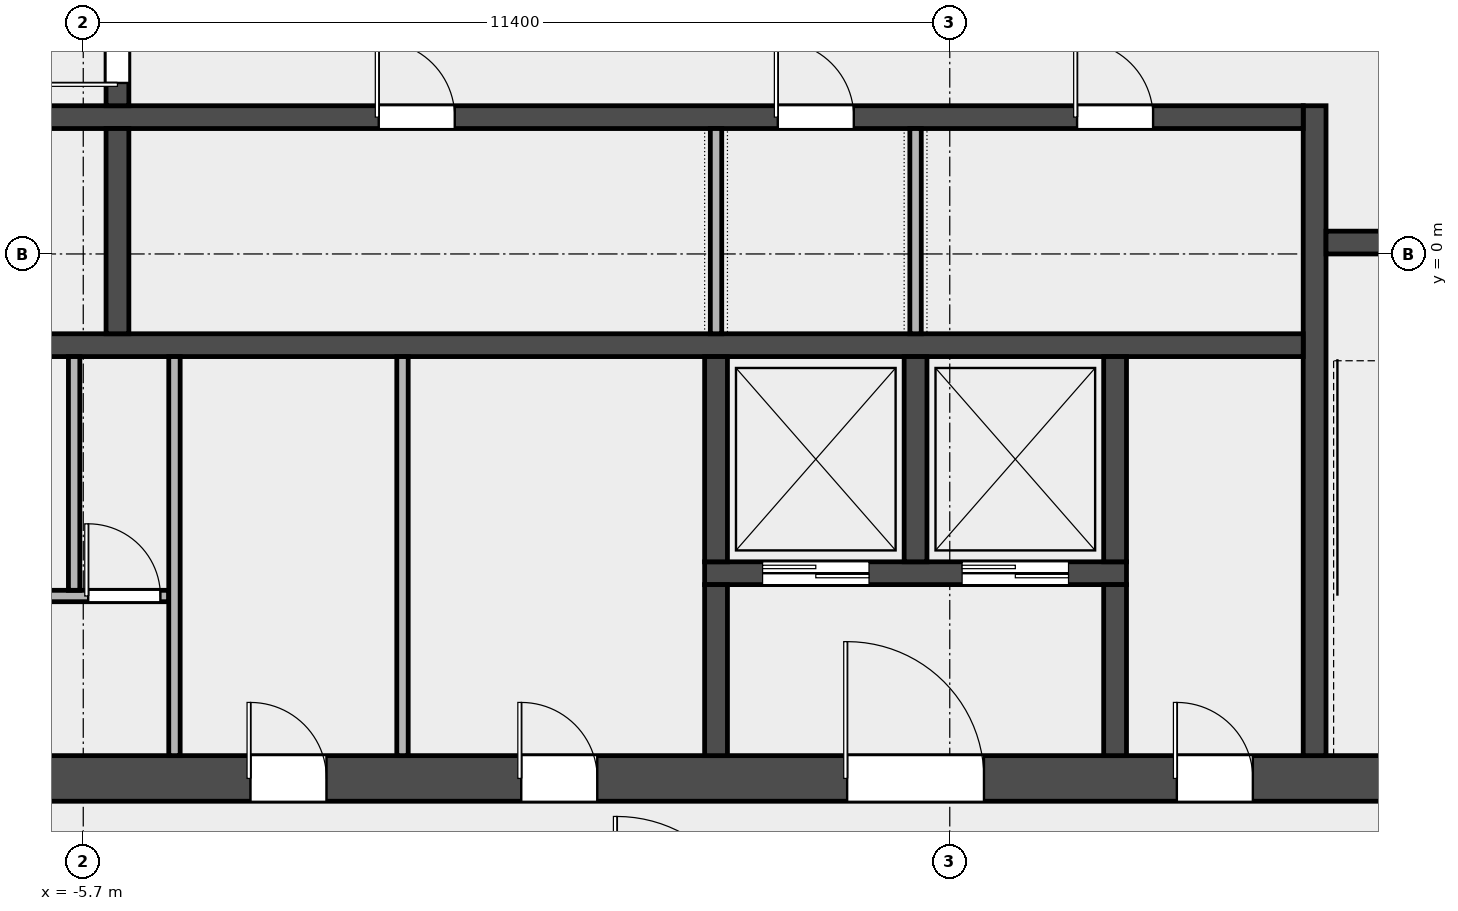
"""IFC4 building model, lengths in metres.
Left out: names, types, materials, properties, quantities, classifications, styles, units other than length and angle.
Written with IfcOpenShell. Run it as: python <this file> out.ifc"""

import sys

from ifc_helpers import new_model, si_unit, direction, frame, frame_2d, origin, place, context, subcontext, project, spatial, rectangle, extrude, element, fill, save


model = new_model("IFC4")
c1 = context("Model", 3, precision=1e-05, world=origin(), true_north=direction((0.0, 1.0)))
c2 = subcontext(c1, "Body", "Model", "MODEL_VIEW")
j1 = project(units=[si_unit("LENGTHUNIT", "METRE"), si_unit("PLANEANGLEUNIT", "RADIAN")], contexts=[c1])
p1 = place(None, origin())
s1 = spatial("IfcSite", under=j1, at=p1, CompositionType="ELEMENT")
p2 = place(p1, origin())
s2 = spatial("IfcBuilding", under=s1, at=p2, CompositionType="ELEMENT")
p3 = place(p2, frame((0.0, 0.0, 247.0)))
s3 = spatial("IfcBuildingStorey", under=s2, at=p3, CompositionType="ELEMENT", Elevation=247.0)
p4 = place(p3, frame((-14.4, -6.9, 0.0), z_axis=(0.0, 0.0, 1.0), x_axis=(1.0, 0.0, 0.0)))
e1 = element("IfcWall", 1, at=p4, inside=s3, PredefinedType="SHEAR", context=c2, shape_type="SweptSolid", body=[
    extrude(rectangle(XDim=28.8, YDim=0.6, at=frame_2d((14.4, 0.0))), origin(), (0.0, 0.0, 1.0), 3.7),
])
p5 = place(p4, frame((6.3, 0.0, 0.0)))
e2 = element("IfcOpeningElement", 2, at=p5, cuts=e1, PredefinedType="OPENING", context=c2, shape_type="SweptSolid", body=[
    extrude(rectangle(XDim=1.2, YDim=2.1, at=frame_2d((0.6, 1.05))), frame((0.0, 0.312, 0.0), z_axis=(0.0, -1.0, 0.0), x_axis=(1.0, 0.0, 0.0)), (0.0, 0.0, 1.0), 0.624),
])
p6 = place(p4, frame((10.9, 0.0, 0.0)))
e3 = element("IfcOpeningElement", 3, at=p6, cuts=e1, PredefinedType="OPENING", context=c2, shape_type="SweptSolid", body=[
    extrude(rectangle(XDim=1.0, YDim=2.1, at=frame_2d((0.5, 1.05))), frame((0.0, 0.312, 0.0), z_axis=(0.0, -1.0, 0.0), x_axis=(1.0, 0.0, 0.0)), (0.0, 0.0, 1.0), 0.624),
])
p7 = place(p4, frame((14.462, 0.0, 0.0)))
e4 = element("IfcOpeningElement", 4, at=p7, cuts=e1, PredefinedType="OPENING", context=c2, shape_type="SweptSolid", body=[
    extrude(rectangle(XDim=1.0, YDim=2.1, at=frame_2d((0.5, 1.05))), frame((0.0, 0.312, 0.0), z_axis=(0.0, -1.0, 0.0), x_axis=(1.0, 0.0, 0.0)), (0.0, 0.0, 1.0), 0.624),
])
p8 = place(p4, frame((18.75, 0.0, 0.0)))
e5 = element("IfcOpeningElement", 5, at=p8, cuts=e1, PredefinedType="OPENING", context=c2, shape_type="SweptSolid", body=[
    extrude(rectangle(XDim=1.8, YDim=2.1, at=frame_2d((0.9, 1.05))), frame((0.0, 0.312, 0.0), z_axis=(0.0, -1.0, 0.0), x_axis=(1.0, 0.0, 0.0)), (0.0, 0.0, 1.0), 0.624),
])
p9 = place(p4, frame((23.087, 0.0, 0.0)))
e6 = element("IfcOpeningElement", 6, at=p9, cuts=e1, PredefinedType="OPENING", context=c2, shape_type="SweptSolid", body=[
    extrude(rectangle(XDim=1.0, YDim=2.1, at=frame_2d((0.5, 1.05))), frame((0.0, 0.312, 0.0), z_axis=(0.0, -1.0, 0.0), x_axis=(1.0, 0.0, 0.0)), (0.0, 0.0, 1.0), 0.624),
])
p10 = place(p3, frame((10.5, -6.6, 0.0), z_axis=(0.0, 0.0, 1.0), x_axis=(0.0, 1.0, 0.0)))
e7 = element("IfcWall", 7, at=p10, inside=s3, PredefinedType="SHEAR", context=c2, shape_type="SweptSolid", body=[
    extrude(rectangle(XDim=8.55, YDim=0.3, at=frame_2d((4.275, 0.0))), origin(), (0.0, 0.0, 1.0), 3.7),
])
p11 = place(p3, frame((10.65, 0.15, 0.0), z_axis=(0.0, 0.0, 1.0), x_axis=(1.0, 0.0, 0.0)))
e8 = element("IfcWall", 8, at=p11, inside=s3, PredefinedType="SOLIDWALL", context=c2, shape_type="SweptSolid", body=[
    extrude(rectangle(XDim=3.15, YDim=0.3, at=frame_2d((1.575, 0.0))), origin(), (0.0, 0.0, 1.0), 3.7),
])
p12 = place(p11, frame((1.025, 0.0, 0.0)))
e9 = element("IfcOpeningElement", 9, at=p12, cuts=e8, PredefinedType="OPENING", context=c2, shape_type="SweptSolid", body=[
    extrude(rectangle(XDim=1.1, YDim=2.1, at=frame_2d((0.55, 1.05))), frame((0.0, 0.162, 0.0), z_axis=(0.0, -1.0, 0.0), x_axis=(1.0, 0.0, 0.0)), (0.0, 0.0, 1.0), 0.324),
])
p13 = place(p3, frame((-10.35, -1.2, 0.0), z_axis=(0.0, 0.0, 1.0), x_axis=(1.0, 0.0, 0.0)))
e10 = element("IfcWall", 10, at=p13, inside=s3, PredefinedType="SOLIDWALL", context=c2, shape_type="SweptSolid", body=[
    extrude(rectangle(XDim=20.7, YDim=0.3, at=frame_2d((10.35, 0.0))), origin(), (0.0, 0.0, 1.0), 3.7),
])
p14 = place(p3, frame((-10.35, 1.8, 0.0), z_axis=(0.0, 0.0, 1.0), x_axis=(1.0, 0.0, 0.0)))
e11 = element("IfcWall", 11, at=p14, inside=s3, PredefinedType="SOLIDWALL", context=c2, shape_type="SweptSolid", body=[
    extrude(rectangle(XDim=20.7, YDim=0.3, at=frame_2d((10.35, 0.0))), origin(), (0.0, 0.0, 1.0), 3.7),
])
p15 = place(p14, frame((0.512, 0.0, 0.0)))
e12 = element("IfcOpeningElement", 12, at=p15, cuts=e11, PredefinedType="OPENING", context=c2, shape_type="SweptSolid", body=[
    extrude(rectangle(XDim=1.3, YDim=2.1, at=frame_2d((0.65, 1.05))), frame((0.0, 0.162, 0.0), z_axis=(0.0, -1.0, 0.0), x_axis=(1.0, 0.0, 0.0)), (0.0, 0.0, 1.0), 0.324),
])
p16 = place(p14, frame((8.538, 0.0, 0.0)))
e13 = element("IfcOpeningElement", 13, at=p16, cuts=e11, PredefinedType="OPENING", context=c2, shape_type="SweptSolid", body=[
    extrude(rectangle(XDim=1.0, YDim=2.1, at=frame_2d((0.5, 1.05))), frame((0.0, 0.162, 0.0), z_axis=(0.0, -1.0, 0.0), x_axis=(1.0, 0.0, 0.0)), (0.0, 0.0, 1.0), 0.324),
])
p17 = place(p14, frame((13.788, 0.0, 0.0)))
e14 = element("IfcOpeningElement", 14, at=p17, cuts=e11, PredefinedType="OPENING", context=c2, shape_type="SweptSolid", body=[
    extrude(rectangle(XDim=1.0, YDim=2.1, at=frame_2d((0.5, 1.05))), frame((0.0, 0.162, 0.0), z_axis=(0.0, -1.0, 0.0), x_axis=(1.0, 0.0, 0.0)), (0.0, 0.0, 1.0), 0.324),
])
p18 = place(p14, frame((17.725, 0.0, 0.0)))
e15 = element("IfcOpeningElement", 15, at=p18, cuts=e11, PredefinedType="OPENING", context=c2, shape_type="SweptSolid", body=[
    extrude(rectangle(XDim=1.0, YDim=2.1, at=frame_2d((0.5, 1.05))), frame((0.0, 0.162, 0.0), z_axis=(0.0, -1.0, 0.0), x_axis=(1.0, 0.0, 0.0)), (0.0, 0.0, 1.0), 0.324),
])
p19 = place(p3, frame((-5.25, -1.05, 0.0), z_axis=(0.0, 0.0, 1.0), x_axis=(0.0, 1.0, 0.0)))
e16 = element("IfcWall", 16, at=p19, inside=s3, PredefinedType="SOLIDWALL", context=c2, shape_type="SweptSolid", body=[
    extrude(rectangle(XDim=2.7, YDim=0.3, at=frame_2d((1.35, 0.0))), origin(), (0.0, 0.0, 1.0), 3.7),
])
p20 = place(p3, frame((-5.25, 1.95, 0.0), z_axis=(0.0, 0.0, 1.0), x_axis=(0.0, 1.0, 0.0)))
e17 = element("IfcWall", 17, at=p20, inside=s3, PredefinedType="SOLIDWALL", context=c2, shape_type="SweptSolid", body=[
    extrude(rectangle(XDim=3.3, YDim=0.3, at=frame_2d((1.65, 0.0))), origin(), (0.0, 0.0, 1.0), 3.7),
])
p21 = place(p20, frame((0.3, 0.0, 0.0)))
e18 = element("IfcOpeningElement", 18, at=p21, cuts=e17, PredefinedType="OPENING", context=c2, shape_type="SweptSolid", body=[
    extrude(rectangle(XDim=1.2, YDim=2.1, at=frame_2d((0.6, 1.05))), frame((0.0, 0.162, 0.0), z_axis=(0.0, -1.0, 0.0), x_axis=(1.0, 0.0, 0.0)), (0.0, 0.0, 1.0), 0.324),
])
p22 = place(p20, frame((1.8, 0.0, 0.0)))
e19 = element("IfcOpeningElement", 19, at=p22, cuts=e17, PredefinedType="OPENING", context=c2, shape_type="SweptSolid", body=[
    extrude(rectangle(XDim=1.2, YDim=2.1, at=frame_2d((0.6, 1.05))), frame((0.0, 0.162, 0.0), z_axis=(0.0, -1.0, 0.0), x_axis=(1.0, 0.0, 0.0)), (0.0, 0.0, 1.0), 0.324),
])
p23 = place(p3, frame((2.475, -4.2, 0.0), z_axis=(0.0, 0.0, 1.0), x_axis=(1.0, 0.0, 0.0)))
e20 = element("IfcWall", 20, at=p23, inside=s3, PredefinedType="SOLIDWALL", context=c2, shape_type="SweptSolid", body=[
    extrude(rectangle(XDim=5.55, YDim=0.3, at=frame_2d((2.775, 0.0))), origin(), (0.0, 0.0, 1.0), 3.7),
])
p24 = place(p23, frame((0.762, 0.0, 0.0)))
e21 = element("IfcOpeningElement", 21, at=p24, cuts=e20, PredefinedType="OPENING", context=c2, shape_type="SweptSolid", body=[
    extrude(rectangle(XDim=1.4, YDim=2.1, at=frame_2d((0.7, 1.05))), frame((0.0, 0.162, 0.0), z_axis=(0.0, -1.0, 0.0), x_axis=(1.0, 0.0, 0.0)), (0.0, 0.0, 1.0), 0.324),
])
p25 = place(p23, frame((3.387, 0.0, 0.0)))
e22 = element("IfcOpeningElement", 22, at=p25, cuts=e20, PredefinedType="OPENING", context=c2, shape_type="SweptSolid", body=[
    extrude(rectangle(XDim=1.4, YDim=2.1, at=frame_2d((0.7, 1.05))), frame((0.0, 0.162, 0.0), z_axis=(0.0, -1.0, 0.0), x_axis=(1.0, 0.0, 0.0)), (0.0, 0.0, 1.0), 0.324),
])
p26 = place(p3, frame((2.625, -4.05, 0.0), z_axis=(0.0, 0.0, 1.0), x_axis=(0.0, 1.0, 0.0)))
e23 = element("IfcWall", 23, at=p26, inside=s3, PredefinedType="SOLIDWALL", context=c2, shape_type="SweptSolid", body=[
    extrude(rectangle(XDim=2.7, YDim=0.3, at=frame_2d((1.35, 0.0))), origin(), (0.0, 0.0, 1.0), 3.7),
])
p27 = place(p3, frame((2.625, -6.6, 0.0), z_axis=(0.0, 0.0, 1.0), x_axis=(0.0, 1.0, 0.0)))
e24 = element("IfcWall", 24, at=p27, inside=s3, PredefinedType="SOLIDWALL", context=c2, shape_type="SweptSolid", body=[
    extrude(rectangle(XDim=2.25, YDim=0.3, at=frame_2d((1.125, 0.0))), origin(), (0.0, 0.0, 1.0), 3.7),
])
for number, where, z_axis, x_axis in (
    (25, (5.25, -4.05, 0.0), (0.0, 0.0, 1.0), (0.0, 1.0, 0.0)),
    (26, (7.875, -4.05, 0.0), (0.0, 0.0, 1.0), (0.0, 1.0, 0.0)),
):
    element("IfcWall", number, at=place(p3, frame(where, z_axis=z_axis, x_axis=x_axis)), inside=s3, PredefinedType="SOLIDWALL", context=c2, shape_type="SweptSolid", body=[
        extrude(rectangle(XDim=2.7, YDim=0.3, at=frame_2d((1.35, 0.0))), origin(), (0.0, 0.0, 1.0), 3.7),
    ])
p28 = place(p3, frame((7.875, -6.6, 0.0), z_axis=(0.0, 0.0, 1.0), x_axis=(0.0, 1.0, 0.0)))
e27 = element("IfcWall", 27, at=p28, inside=s3, PredefinedType="SOLIDWALL", context=c2, shape_type="SweptSolid", body=[
    extrude(rectangle(XDim=2.25, YDim=0.3, at=frame_2d((1.125, 0.0))), origin(), (0.0, 0.0, 1.0), 3.7),
])
p29 = place(p3, frame((-10.35, -4.5, 0.0), z_axis=(0.0, 0.0, 1.0), x_axis=(1.0, 0.0, 0.0)))
e28 = element("IfcWall", 28, at=p29, inside=s3, PredefinedType="PARTITIONING", context=c2, shape_type="SweptSolid", body=[
    extrude(rectangle(XDim=5.775, YDim=0.15, at=frame_2d((2.888, 0.0))), origin(), (0.0, 0.0, 1.0), 3.7),
])
p30 = place(p29, frame((0.6, 0.0, 0.0)))
e29 = element("IfcOpeningElement", 29, at=p30, cuts=e28, PredefinedType="OPENING", context=c2, shape_type="SweptSolid", body=[
    extrude(rectangle(XDim=0.9, YDim=2.1, at=frame_2d((0.45, 1.05))), frame((0.0, 0.087, 0.0), z_axis=(0.0, -1.0, 0.0), x_axis=(1.0, 0.0, 0.0)), (0.0, 0.0, 1.0), 0.174),
])
p31 = place(p29, frame((2.94, 0.0, 0.0)))
e30 = element("IfcOpeningElement", 30, at=p31, cuts=e28, PredefinedType="OPENING", context=c2, shape_type="SweptSolid", body=[
    extrude(rectangle(XDim=0.9, YDim=2.1, at=frame_2d((0.45, 1.05))), frame((0.0, 0.087, 0.0), z_axis=(0.0, -1.0, 0.0), x_axis=(1.0, 0.0, 0.0)), (0.0, 0.0, 1.0), 0.174),
])
p32 = place(p29, frame((4.715, 0.0, 0.0)))
e31 = element("IfcOpeningElement", 31, at=p32, cuts=e28, PredefinedType="OPENING", context=c2, shape_type="SweptSolid", body=[
    extrude(rectangle(XDim=0.95, YDim=2.1, at=frame_2d((0.475, 1.05))), frame((0.0, 0.087, 0.0), z_axis=(0.0, -1.0, 0.0), x_axis=(1.0, 0.0, 0.0)), (0.0, 0.0, 1.0), 0.174),
])
p33 = place(p3, frame((-5.82, -4.425, 0.0), z_axis=(0.0, 0.0, 1.0), x_axis=(0.0, 1.0, 0.0)))
e32 = element("IfcWall", 32, at=p33, inside=s3, PredefinedType="PARTITIONING", context=c2, shape_type="SweptSolid", body=[
    extrude(rectangle(XDim=3.075, YDim=0.15, at=frame_2d((1.538, 0.0))), origin(), (0.0, 0.0, 1.0), 3.7),
])
for number, where, z_axis, x_axis in (
    (33, (-4.5, -6.6, 0.0), (0.0, 0.0, 1.0), (0.0, 1.0, 0.0)),
    (34, (-1.5, -6.6, 0.0), (0.0, 0.0, 1.0), (0.0, 1.0, 0.0)),
):
    element("IfcWall", number, at=place(p3, frame(where, z_axis=z_axis, x_axis=x_axis)), inside=s3, PredefinedType="PARTITIONING", context=c2, shape_type="SweptSolid", body=[
        extrude(rectangle(XDim=5.25, YDim=0.15, at=frame_2d((2.625, 0.0))), origin(), (0.0, 0.0, 1.0), 3.7),
    ])
for number, where, z_axis, x_axis in (
    (35, (2.625, -1.05, 0.0), (0.0, 0.0, 1.0), (0.0, 1.0, 0.0)),
    (36, (5.25, -1.05, 0.0), (0.0, 0.0, 1.0), (0.0, 1.0, 0.0)),
):
    element("IfcWall", number, at=place(p3, frame(where, z_axis=z_axis, x_axis=x_axis)), inside=s3, PredefinedType="PARTITIONING", context=c2, shape_type="SweptSolid", body=[
        extrude(rectangle(XDim=2.7, YDim=0.15, at=frame_2d((1.35, 0.0))), origin(), (0.0, 0.0, 1.0), 3.7),
    ])
p34 = place(p21, origin())
e37 = element("IfcDoor", 37, at=p34, inside=s3, OperationType="SINGLE_SWING_LEFT", PredefinedType="DOOR", context=c2, shape_type="SweptSolid", body=[
    extrude(rectangle(XDim=1.2, YDim=2.1, at=frame_2d((0.6, 1.05))), frame((0.0, 0.025, 0.0), z_axis=(0.0, -1.0, 0.0), x_axis=(1.0, 0.0, 0.0)), (0.0, 0.0, 1.0), 0.05),
])
fill(e18, e37)
p35 = place(p24, origin())
e38 = element("IfcDoor", 38, at=p35, inside=s3, OperationType="DOUBLE_DOOR_SLIDING", PredefinedType="DOOR", context=c2, shape_type="SweptSolid", body=[
    extrude(rectangle(XDim=1.4, YDim=2.1, at=frame_2d((0.7, 1.05))), frame((0.0, 0.025, 0.0), z_axis=(0.0, -1.0, 0.0), x_axis=(1.0, 0.0, 0.0)), (0.0, 0.0, 1.0), 0.05),
])
fill(e21, e38)
p36 = place(p25, origin())
e39 = element("IfcDoor", 39, at=p36, inside=s3, OperationType="DOUBLE_DOOR_SLIDING", PredefinedType="DOOR", context=c2, shape_type="SweptSolid", body=[
    extrude(rectangle(XDim=1.4, YDim=2.1, at=frame_2d((0.7, 1.05))), frame((0.0, 0.025, 0.0), z_axis=(0.0, -1.0, 0.0), x_axis=(1.0, 0.0, 0.0)), (0.0, 0.0, 1.0), 0.05),
])
fill(e22, e39)
p37 = place(p32, origin())
e40 = element("IfcDoor", 40, at=p37, inside=s3, OperationType="SINGLE_SWING_LEFT", PredefinedType="DOOR", context=c2, shape_type="SweptSolid", body=[
    extrude(rectangle(XDim=0.95, YDim=2.1, at=frame_2d((0.475, 1.05))), frame((0.0, 0.025, 0.0), z_axis=(0.0, -1.0, 0.0), x_axis=(1.0, 0.0, 0.0)), (0.0, 0.0, 1.0), 0.05),
])
fill(e31, e40)
p38 = place(p6, origin())
e41 = element("IfcDoor", 41, at=p38, inside=s3, OperationType="SINGLE_SWING_LEFT", PredefinedType="DOOR", context=c2, shape_type="SweptSolid", body=[
    extrude(rectangle(XDim=1.0, YDim=2.1, at=frame_2d((0.5, 1.05))), frame((0.0, 0.025, 0.0), z_axis=(0.0, -1.0, 0.0), x_axis=(1.0, 0.0, 0.0)), (0.0, 0.0, 1.0), 0.05),
])
fill(e3, e41)
p39 = place(p7, origin())
e42 = element("IfcDoor", 42, at=p39, inside=s3, OperationType="SINGLE_SWING_LEFT", PredefinedType="DOOR", context=c2, shape_type="SweptSolid", body=[
    extrude(rectangle(XDim=1.0, YDim=2.1, at=frame_2d((0.5, 1.05))), frame((0.0, 0.025, 0.0), z_axis=(0.0, -1.0, 0.0), x_axis=(1.0, 0.0, 0.0)), (0.0, 0.0, 1.0), 0.05),
])
fill(e4, e42)
p40 = place(p8, origin())
e43 = element("IfcDoor", 43, at=p40, inside=s3, OperationType="DOUBLE_DOOR_SINGLE_SWING", PredefinedType="DOOR", context=c2, shape_type="SweptSolid", body=[
    extrude(rectangle(XDim=1.8, YDim=2.1, at=frame_2d((0.9, 1.05))), frame((0.0, 0.025, 0.0), z_axis=(0.0, -1.0, 0.0), x_axis=(1.0, 0.0, 0.0)), (0.0, 0.0, 1.0), 0.05),
])
fill(e5, e43)
p41 = place(p9, origin())
e44 = element("IfcDoor", 44, at=p41, inside=s3, OperationType="SINGLE_SWING_LEFT", PredefinedType="DOOR", context=c2, shape_type="SweptSolid", body=[
    extrude(rectangle(XDim=1.0, YDim=2.1, at=frame_2d((0.5, 1.05))), frame((0.0, 0.025, 0.0), z_axis=(0.0, -1.0, 0.0), x_axis=(1.0, 0.0, 0.0)), (0.0, 0.0, 1.0), 0.05),
])
fill(e6, e44)
p42 = place(p16, origin())
e45 = element("IfcDoor", 45, at=p42, inside=s3, OperationType="SINGLE_SWING_LEFT", PredefinedType="DOOR", context=c2, shape_type="SweptSolid", body=[
    extrude(rectangle(XDim=1.0, YDim=2.1, at=frame_2d((0.5, 1.05))), frame((0.0, 0.025, 0.0), z_axis=(0.0, -1.0, 0.0), x_axis=(1.0, 0.0, 0.0)), (0.0, 0.0, 1.0), 0.05),
])
fill(e13, e45)
p43 = place(p17, origin())
e46 = element("IfcDoor", 46, at=p43, inside=s3, OperationType="SINGLE_SWING_LEFT", PredefinedType="DOOR", context=c2, shape_type="SweptSolid", body=[
    extrude(rectangle(XDim=1.0, YDim=2.1, at=frame_2d((0.5, 1.05))), frame((0.0, 0.025, 0.0), z_axis=(0.0, -1.0, 0.0), x_axis=(1.0, 0.0, 0.0)), (0.0, 0.0, 1.0), 0.05),
])
fill(e14, e46)
p44 = place(p18, origin())
e47 = element("IfcDoor", 47, at=p44, inside=s3, OperationType="SINGLE_SWING_LEFT", PredefinedType="DOOR", context=c2, shape_type="SweptSolid", body=[
    extrude(rectangle(XDim=1.0, YDim=2.1, at=frame_2d((0.5, 1.05))), frame((0.0, 0.025, 0.0), z_axis=(0.0, -1.0, 0.0), x_axis=(1.0, 0.0, 0.0)), (0.0, 0.0, 1.0), 0.05),
])
fill(e15, e47)
save(model, sys.argv[1])
